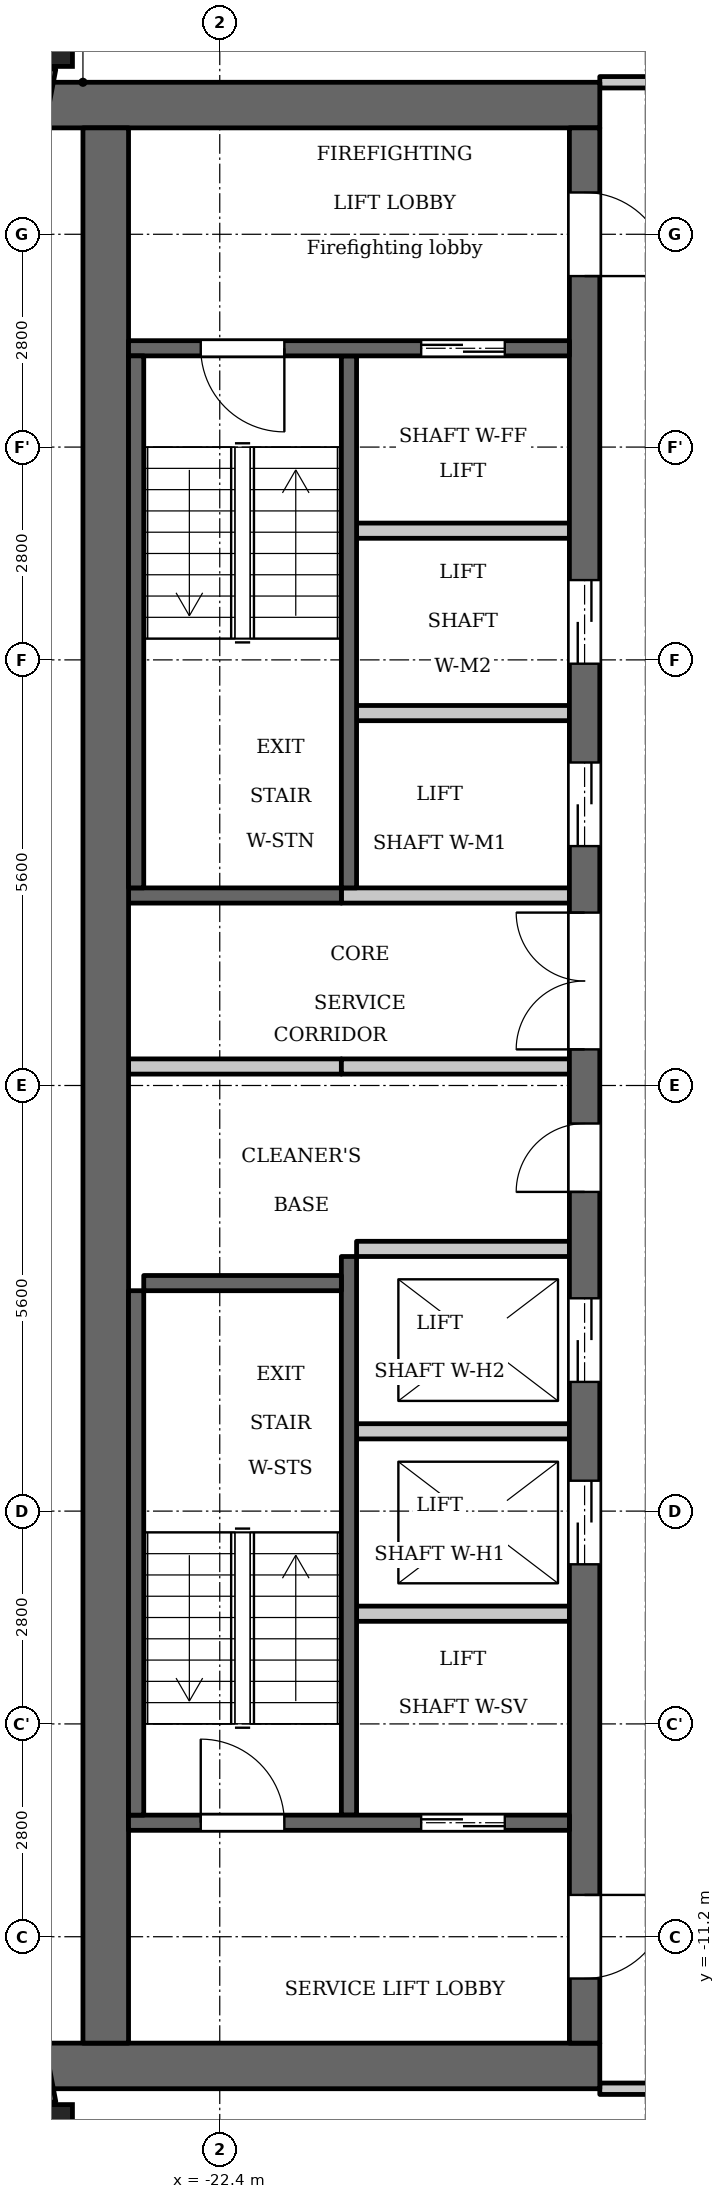
"""IFC4 building model, lengths in metres.
Left out: names, types, materials, properties, quantities, classifications, styles, units other than length and angle.
Written with IfcOpenShell. Run it as: python <this file> out.ifc"""

import sys

from ifc_helpers import new_model, si_unit, direction, frame, frame_2d, origin, origin_2d, place, context, subcontext, project, spatial, rectangle, extrude, element, fill, save


model = new_model("IFC4")
c1 = context("Model", 3, precision=1e-05, world=origin(), true_north=direction((0.0, 1.0)))
c2 = subcontext(c1, "Body", "Model", "MODEL_VIEW")
j1 = project(units=[si_unit("LENGTHUNIT", "METRE"), si_unit("PLANEANGLEUNIT", "RADIAN")], contexts=[c1])
p1 = place(None, origin())
s1 = spatial("IfcSite", under=j1, at=p1, CompositionType="ELEMENT")
p2 = place(p1, origin())
s2 = spatial("IfcBuilding", under=s1, at=p2, CompositionType="ELEMENT")
p3 = place(p2, frame((0.0, 0.0, 241.7)))
s3 = spatial("IfcBuildingStorey", under=s2, at=p3, CompositionType="ELEMENT", Elevation=241.7)
for number, where, z_axis, x_axis in (
    (1, (-24.738, 13.809, 0.0), (0.0, 0.0, 1.0), (1.0, 0.0, 0.0)),
    (2, (-24.738, -13.809, 0.0), (0.0, 0.0, 1.0), (1.0, 0.0, 0.0)),
):
    element("IfcColumn", number, at=place(p3, frame(where, z_axis=z_axis, x_axis=x_axis)), inside=s3, PredefinedType="COLUMN", context=c2, shape_type="SweptSolid", body=[
        extrude(rectangle(XDim=0.8, YDim=0.8, at=origin_2d()), origin(), (0.0, 0.0, 1.0), 3.5),
    ])
for number, where, z_axis, x_axis in (
    (3, (-24.705, 13.395, 0.0), (0.0, 0.0, 1.0), (-0.187, -0.982, 0.0)),
    (4, (-25.053, -11.572, 0.0), (0.0, 0.0, 1.0), (0.187, -0.982, 0.0)),
):
    element("IfcWall", number, at=place(p3, frame(where, z_axis=z_axis, x_axis=x_axis)), inside=s3, PredefinedType="SOLIDWALL", context=c2, shape_type="SweptSolid", body=[
        extrude(rectangle(XDim=1.856, YDim=0.3, at=frame_2d((0.928, 0.0))), origin(), (0.0, 0.0, 1.0), 2.55),
    ])
p4 = place(p3, frame((-20.7, 2.6, 0.0), z_axis=(0.0, 0.0, 1.0), x_axis=(0.0, 1.0, 0.0)))
e5 = element("IfcWall", 5, at=p4, inside=s3, PredefinedType="SHEAR", context=c2, shape_type="SweptSolid", body=[
    extrude(rectangle(XDim=7.0, YDim=0.2, at=frame_2d((3.5, 0.0))), origin(), (0.0, 0.0, 1.0), 3.2),
])
p5 = place(p3, frame((-20.7, -9.6, 0.0), z_axis=(0.0, 0.0, 1.0), x_axis=(0.0, 1.0, 0.0)))
e6 = element("IfcWall", 6, at=p5, inside=s3, PredefinedType="SHEAR", context=c2, shape_type="SweptSolid", body=[
    extrude(rectangle(XDim=7.35, YDim=0.2, at=frame_2d((3.675, 0.0))), origin(), (0.0, 0.0, 1.0), 3.2),
])
p6 = place(p3, frame((-20.8, 2.5, 0.0), z_axis=(0.0, 0.0, 1.0), x_axis=(-1.0, 0.0, 0.0)))
e7 = element("IfcWall", 7, at=p6, inside=s3, PredefinedType="SHEAR", context=c2, shape_type="SweptSolid", body=[
    extrude(rectangle(XDim=2.8, YDim=0.2, at=frame_2d((1.4, 0.0))), origin(), (0.0, 0.0, 1.0), 3.2),
])
p7 = place(p3, frame((-20.8, 0.25, 0.0), z_axis=(0.0, 0.0, 1.0), x_axis=(-1.0, 0.0, 0.0)))
e8 = element("IfcWall", 8, at=p7, inside=s3, PredefinedType="PARTITIONING", context=c2, shape_type="SweptSolid", body=[
    extrude(rectangle(XDim=2.8, YDim=0.2, at=frame_2d((1.4, 0.0))), origin(), (0.0, 0.0, 1.0), 3.2),
])
for number, where, z_axis, x_axis in (
    (9, (-17.4, 12.9, 0.0), (0.0, 0.0, 1.0), (-1.0, 0.0, 0.0)),
    (10, (-17.4, -12.9, 0.0), (0.0, 0.0, 1.0), (-1.0, 0.0, 0.0)),
):
    element("IfcWall", number, at=place(p3, frame(where, z_axis=z_axis, x_axis=x_axis)), inside=s3, PredefinedType="SHEAR", context=c2, shape_type="SweptSolid", body=[
        extrude(rectangle(XDim=7.32, YDim=0.6, at=frame_2d((3.66, 0.0))), origin(), (0.0, 0.0, 1.0), 3.2),
    ])
p8 = place(p3, frame((-17.6, -12.6, 0.0), z_axis=(0.0, 0.0, 1.0), x_axis=(0.0, 1.0, 0.0)))
e11 = element("IfcWall", 11, at=p8, inside=s3, PredefinedType="SHEAR", context=c2, shape_type="SweptSolid", body=[
    extrude(rectangle(XDim=25.2, YDim=0.4, at=frame_2d((12.6, 0.0))), origin(), (0.0, 0.0, 1.0), 3.2),
])
p9 = place(p8, frame((6.3, 0.0, 0.0)))
e12 = element("IfcOpeningElement", 12, at=p9, cuts=e11, PredefinedType="OPENING", context=c2, shape_type="SweptSolid", body=[
    extrude(rectangle(XDim=1.1, YDim=2.1, at=frame_2d((0.55, 1.05))), frame((0.0, 0.21, 0.0), z_axis=(0.0, -1.0, 0.0), x_axis=(1.0, 0.0, 0.0)), (0.0, 0.0, 1.0), 0.42),
])
p10 = place(p8, frame((8.7, 0.0, 0.0)))
e13 = element("IfcOpeningElement", 13, at=p10, cuts=e11, PredefinedType="OPENING", context=c2, shape_type="SweptSolid", body=[
    extrude(rectangle(XDim=1.1, YDim=2.1, at=frame_2d((0.55, 1.05))), frame((0.0, 0.21, 0.0), z_axis=(0.0, -1.0, 0.0), x_axis=(1.0, 0.0, 0.0)), (0.0, 0.0, 1.0), 0.42),
])
p11 = place(p8, frame((11.2, 0.0, 0.0)))
e14 = element("IfcOpeningElement", 14, at=p11, cuts=e11, PredefinedType="OPENING", context=c2, shape_type="SweptSolid", body=[
    extrude(rectangle(XDim=0.9, YDim=2.1, at=frame_2d((0.45, 1.05))), frame((0.0, 0.21, 0.0), z_axis=(0.0, -1.0, 0.0), x_axis=(1.0, 0.0, 0.0)), (0.0, 0.0, 1.0), 0.42),
])
p12 = place(p8, frame((15.75, 0.0, 0.0)))
e15 = element("IfcOpeningElement", 15, at=p12, cuts=e11, PredefinedType="OPENING", context=c2, shape_type="SweptSolid", body=[
    extrude(rectangle(XDim=1.1, YDim=2.1, at=frame_2d((0.55, 1.05))), frame((0.0, 0.21, 0.0), z_axis=(0.0, -1.0, 0.0), x_axis=(1.0, 0.0, 0.0)), (0.0, 0.0, 1.0), 0.42),
])
p13 = place(p8, frame((18.15, 0.0, 0.0)))
e16 = element("IfcOpeningElement", 16, at=p13, cuts=e11, PredefinedType="OPENING", context=c2, shape_type="SweptSolid", body=[
    extrude(rectangle(XDim=1.1, YDim=2.1, at=frame_2d((0.55, 1.05))), frame((0.0, 0.21, 0.0), z_axis=(0.0, -1.0, 0.0), x_axis=(1.0, 0.0, 0.0)), (0.0, 0.0, 1.0), 0.42),
])
p14 = place(p8, frame((23.25, 0.0, 0.0)))
e17 = element("IfcOpeningElement", 17, at=p14, cuts=e11, PredefinedType="OPENING", context=c2, shape_type="SweptSolid", body=[
    extrude(rectangle(XDim=1.1, YDim=2.1, at=frame_2d((0.55, 1.05))), frame((0.0, 0.21, 0.0), z_axis=(0.0, -1.0, 0.0), x_axis=(1.0, 0.0, 0.0)), (0.0, 0.0, 1.0), 0.42),
])
p15 = place(p8, frame((0.85, 0.0, 0.0)))
e18 = element("IfcOpeningElement", 18, at=p15, cuts=e11, PredefinedType="OPENING", context=c2, shape_type="SweptSolid", body=[
    extrude(rectangle(XDim=1.1, YDim=2.1, at=frame_2d((0.55, 1.05))), frame((0.0, 0.21, 0.0), z_axis=(0.0, -1.0, 0.0), x_axis=(1.0, 0.0, 0.0)), (0.0, 0.0, 1.0), 0.42),
])
p16 = place(p8, frame((13.075, 0.0, 0.0)))
e19 = element("IfcOpeningElement", 19, at=p16, cuts=e11, PredefinedType="OPENING", context=c2, shape_type="SweptSolid", body=[
    extrude(rectangle(XDim=1.8, YDim=2.1, at=frame_2d((0.9, 1.05))), frame((0.0, 0.21, 0.0), z_axis=(0.0, -1.0, 0.0), x_axis=(1.0, 0.0, 0.0)), (0.0, 0.0, 1.0), 0.42),
])
p17 = place(p3, frame((-23.9, -12.6, 0.0), z_axis=(0.0, 0.0, 1.0), x_axis=(0.0, 1.0, 0.0)))
e20 = element("IfcWall", 20, at=p17, inside=s3, PredefinedType="SHEAR", context=c2, shape_type="SweptSolid", body=[
    extrude(rectangle(XDim=25.2, YDim=0.6, at=frame_2d((12.6, 0.0))), origin(), (0.0, 0.0, 1.0), 3.2),
])
p18 = place(p3, frame((-17.8, -9.7, 0.0), z_axis=(0.0, 0.0, 1.0), x_axis=(-1.0, 0.0, 0.0)))
e21 = element("IfcWall", 21, at=p18, inside=s3, PredefinedType="SHEAR", context=c2, shape_type="SweptSolid", body=[
    extrude(rectangle(XDim=5.8, YDim=0.2, at=frame_2d((2.9, 0.0))), origin(), (0.0, 0.0, 1.0), 3.2),
])
p19 = place(p18, frame((0.85, 0.0, 0.0)))
e22 = element("IfcOpeningElement", 22, at=p19, cuts=e21, PredefinedType="OPENING", context=c2, shape_type="SweptSolid", body=[
    extrude(rectangle(XDim=1.1, YDim=2.1, at=frame_2d((0.55, 1.05))), frame((0.0, 0.11, 0.0), z_axis=(0.0, -1.0, 0.0), x_axis=(1.0, 0.0, 0.0)), (0.0, 0.0, 1.0), 0.22),
])
p20 = place(p18, frame((3.75, 0.0, 0.0)))
e23 = element("IfcOpeningElement", 23, at=p20, cuts=e21, PredefinedType="OPENING", context=c2, shape_type="SweptSolid", body=[
    extrude(rectangle(XDim=1.1, YDim=2.1, at=frame_2d((0.55, 1.05))), frame((0.0, 0.11, 0.0), z_axis=(0.0, -1.0, 0.0), x_axis=(1.0, 0.0, 0.0)), (0.0, 0.0, 1.0), 0.22),
])
for number, where, z_axis, x_axis in (
    (24, (-17.8, -6.95, 0.0), (0.0, 0.0, 1.0), (-1.0, 0.0, 0.0)),
    (25, (-17.8, -4.55, 0.0), (0.0, 0.0, 1.0), (-1.0, 0.0, 0.0)),
    (26, (-17.8, -2.15, 0.0), (0.0, 0.0, 1.0), (-1.0, 0.0, 0.0)),
):
    element("IfcWall", number, at=place(p3, frame(where, z_axis=z_axis, x_axis=x_axis)), inside=s3, PredefinedType="PARTITIONING", context=c2, shape_type="SweptSolid", body=[
        extrude(rectangle(XDim=2.8, YDim=0.2, at=frame_2d((1.4, 0.0))), origin(), (0.0, 0.0, 1.0), 3.2),
    ])
for number, where, z_axis, x_axis in (
    (27, (-17.8, 0.25, 0.0), (0.0, 0.0, 1.0), (-1.0, 0.0, 0.0)),
    (28, (-17.8, 2.5, 0.0), (0.0, 0.0, 1.0), (-1.0, 0.0, 0.0)),
):
    element("IfcWall", number, at=place(p3, frame(where, z_axis=z_axis, x_axis=x_axis)), inside=s3, PredefinedType="PARTITIONING", context=c2, shape_type="SweptSolid", body=[
        extrude(rectangle(XDim=3.0, YDim=0.2, at=frame_2d((1.5, 0.0))), origin(), (0.0, 0.0, 1.0), 3.2),
    ])
for number, where, z_axis, x_axis in (
    (29, (-17.8, 4.9, 0.0), (0.0, 0.0, 1.0), (-1.0, 0.0, 0.0)),
    (30, (-17.8, 7.3, 0.0), (0.0, 0.0, 1.0), (-1.0, 0.0, 0.0)),
):
    element("IfcWall", number, at=place(p3, frame(where, z_axis=z_axis, x_axis=x_axis)), inside=s3, PredefinedType="PARTITIONING", context=c2, shape_type="SweptSolid", body=[
        extrude(rectangle(XDim=2.8, YDim=0.2, at=frame_2d((1.4, 0.0))), origin(), (0.0, 0.0, 1.0), 3.2),
    ])
p21 = place(p3, frame((-17.8, 9.7, 0.0), z_axis=(0.0, 0.0, 1.0), x_axis=(-1.0, 0.0, 0.0)))
e31 = element("IfcWall", 31, at=p21, inside=s3, PredefinedType="SHEAR", context=c2, shape_type="SweptSolid", body=[
    extrude(rectangle(XDim=5.8, YDim=0.2, at=frame_2d((2.9, 0.0))), origin(), (0.0, 0.0, 1.0), 3.2),
])
p22 = place(p21, frame((0.85, 0.0, 0.0)))
e32 = element("IfcOpeningElement", 32, at=p22, cuts=e31, PredefinedType="OPENING", context=c2, shape_type="SweptSolid", body=[
    extrude(rectangle(XDim=1.1, YDim=2.1, at=frame_2d((0.55, 1.05))), frame((0.0, 0.11, 0.0), z_axis=(0.0, -1.0, 0.0), x_axis=(1.0, 0.0, 0.0)), (0.0, 0.0, 1.0), 0.22),
])
p23 = place(p21, frame((3.75, 0.0, 0.0)))
e33 = element("IfcOpeningElement", 33, at=p23, cuts=e31, PredefinedType="OPENING", context=c2, shape_type="SweptSolid", body=[
    extrude(rectangle(XDim=1.1, YDim=2.1, at=frame_2d((0.55, 1.05))), frame((0.0, 0.11, 0.0), z_axis=(0.0, -1.0, 0.0), x_axis=(1.0, 0.0, 0.0)), (0.0, 0.0, 1.0), 0.22),
])
p24 = place(p3, frame((-23.5, 2.6, 0.0), z_axis=(0.0, 0.0, 1.0), x_axis=(0.0, 1.0, 0.0)))
e34 = element("IfcWall", 34, at=p24, inside=s3, PredefinedType="SHEAR", context=c2, shape_type="SweptSolid", body=[
    extrude(rectangle(XDim=7.0, YDim=0.2, at=frame_2d((3.5, 0.0))), origin(), (0.0, 0.0, 1.0), 3.2),
])
p25 = place(p3, frame((-23.5, -9.6, 0.0), z_axis=(0.0, 0.0, 1.0), x_axis=(0.0, 1.0, 0.0)))
e35 = element("IfcWall", 35, at=p25, inside=s3, PredefinedType="SHEAR", context=c2, shape_type="SweptSolid", body=[
    extrude(rectangle(XDim=6.9, YDim=0.2, at=frame_2d((3.45, 0.0))), origin(), (0.0, 0.0, 1.0), 3.2),
])
p26 = place(p3, frame((-20.8, -2.6, 0.0), z_axis=(0.0, 0.0, 1.0), x_axis=(-1.0, 0.0, 0.0)))
e36 = element("IfcWall", 36, at=p26, inside=s3, PredefinedType="SHEAR", context=c2, shape_type="SweptSolid", body=[
    extrude(rectangle(XDim=2.6, YDim=0.2, at=frame_2d((1.3, 0.0))), origin(), (0.0, 0.0, 1.0), 3.2),
])
p27 = place(p3, frame((-17.4, -13.2, 0.0), z_axis=(0.0, 0.0, 1.0), x_axis=(1.0, 0.0, 0.0)))
e37 = element("IfcWall", 37, at=p27, inside=s3, PredefinedType="PARTITIONING", context=c2, shape_type="SweptSolid", body=[
    extrude(rectangle(XDim=2.325, YDim=0.15, at=frame_2d((1.163, 0.0))), origin(), (0.0, 0.0, 1.0), 3.2),
])
p28 = place(p27, frame((0.65, 0.0, 0.0)))
e38 = element("IfcOpeningElement", 38, at=p28, cuts=e37, PredefinedType="OPENING", context=c2, shape_type="SweptSolid", body=[
    extrude(rectangle(XDim=1.0, YDim=2.1, at=frame_2d((0.5, 1.05))), frame((0.0, 0.085, 0.0), z_axis=(0.0, -1.0, 0.0), x_axis=(1.0, 0.0, 0.0)), (0.0, 0.0, 1.0), 0.17),
])
p29 = place(p3, frame((-17.4, 13.2, 0.0), z_axis=(0.0, 0.0, 1.0), x_axis=(1.0, 0.0, 0.0)))
e39 = element("IfcWall", 39, at=p29, inside=s3, PredefinedType="PARTITIONING", context=c2, shape_type="SweptSolid", body=[
    extrude(rectangle(XDim=2.325, YDim=0.15, at=frame_2d((1.163, 0.0))), origin(), (0.0, 0.0, 1.0), 3.2),
])
p30 = place(p29, frame((0.75, 0.0, 0.0)))
e40 = element("IfcOpeningElement", 40, at=p30, cuts=e39, PredefinedType="OPENING", context=c2, shape_type="SweptSolid", body=[
    extrude(rectangle(XDim=1.0, YDim=2.1, at=frame_2d((0.5, 1.05))), frame((0.0, 0.085, 0.0), z_axis=(0.0, -1.0, 0.0), x_axis=(1.0, 0.0, 0.0)), (0.0, 0.0, 1.0), 0.17),
])
p31 = place(p19, origin())
e41 = element("IfcDoor", 41, at=p31, inside=s3, OperationType="DOUBLE_DOOR_SLIDING", PredefinedType="DOOR", context=c2, shape_type="SweptSolid", body=[
    extrude(rectangle(XDim=1.1, YDim=2.1, at=frame_2d((0.55, 1.05))), frame((0.0, 0.025, 0.0), z_axis=(0.0, -1.0, 0.0), x_axis=(1.0, 0.0, 0.0)), (0.0, 0.0, 1.0), 0.05),
])
fill(e22, e41)
p32 = place(p9, origin())
e42 = element("IfcDoor", 42, at=p32, inside=s3, OperationType="DOUBLE_DOOR_SLIDING", PredefinedType="DOOR", context=c2, shape_type="SweptSolid", body=[
    extrude(rectangle(XDim=1.1, YDim=2.1, at=frame_2d((0.55, 1.05))), frame((0.0, 0.025, 0.0), z_axis=(0.0, -1.0, 0.0), x_axis=(1.0, 0.0, 0.0)), (0.0, 0.0, 1.0), 0.05),
])
fill(e12, e42)
p33 = place(p10, origin())
e43 = element("IfcDoor", 43, at=p33, inside=s3, OperationType="DOUBLE_DOOR_SLIDING", PredefinedType="DOOR", context=c2, shape_type="SweptSolid", body=[
    extrude(rectangle(XDim=1.1, YDim=2.1, at=frame_2d((0.55, 1.05))), frame((0.0, 0.025, 0.0), z_axis=(0.0, -1.0, 0.0), x_axis=(1.0, 0.0, 0.0)), (0.0, 0.0, 1.0), 0.05),
])
fill(e13, e43)
p34 = place(p11, origin())
e44 = element("IfcDoor", 44, at=p34, inside=s3, OperationType="SINGLE_SWING_RIGHT", PredefinedType="DOOR", context=c2, shape_type="SweptSolid", body=[
    extrude(rectangle(XDim=0.9, YDim=2.1, at=frame_2d((0.45, 1.05))), frame((0.0, 0.025, 0.0), z_axis=(0.0, -1.0, 0.0), x_axis=(1.0, 0.0, 0.0)), (0.0, 0.0, 1.0), 0.05),
])
fill(e14, e44)
p35 = place(p12, origin())
e45 = element("IfcDoor", 45, at=p35, inside=s3, OperationType="DOUBLE_DOOR_SLIDING", PredefinedType="DOOR", context=c2, shape_type="SweptSolid", body=[
    extrude(rectangle(XDim=1.1, YDim=2.1, at=frame_2d((0.55, 1.05))), frame((0.0, 0.025, 0.0), z_axis=(0.0, -1.0, 0.0), x_axis=(1.0, 0.0, 0.0)), (0.0, 0.0, 1.0), 0.05),
])
fill(e15, e45)
p36 = place(p13, origin())
e46 = element("IfcDoor", 46, at=p36, inside=s3, OperationType="DOUBLE_DOOR_SLIDING", PredefinedType="DOOR", context=c2, shape_type="SweptSolid", body=[
    extrude(rectangle(XDim=1.1, YDim=2.1, at=frame_2d((0.55, 1.05))), frame((0.0, 0.025, 0.0), z_axis=(0.0, -1.0, 0.0), x_axis=(1.0, 0.0, 0.0)), (0.0, 0.0, 1.0), 0.05),
])
fill(e16, e46)
p37 = place(p22, origin())
e47 = element("IfcDoor", 47, at=p37, inside=s3, OperationType="DOUBLE_DOOR_SLIDING", PredefinedType="DOOR", context=c2, shape_type="SweptSolid", body=[
    extrude(rectangle(XDim=1.1, YDim=2.1, at=frame_2d((0.55, 1.05))), frame((0.0, 0.025, 0.0), z_axis=(0.0, -1.0, 0.0), x_axis=(1.0, 0.0, 0.0)), (0.0, 0.0, 1.0), 0.05),
])
fill(e32, e47)
p38 = place(p14, origin())
e48 = element("IfcDoor", 48, at=p38, inside=s3, OperationType="SINGLE_SWING_LEFT", PredefinedType="DOOR", context=c2, shape_type="SweptSolid", body=[
    extrude(rectangle(XDim=1.1, YDim=2.1, at=frame_2d((0.55, 1.05))), frame((0.0, 0.025, 0.0), z_axis=(0.0, -1.0, 0.0), x_axis=(1.0, 0.0, 0.0)), (0.0, 0.0, 1.0), 0.05),
])
fill(e17, e48)
p39 = place(p15, origin())
e49 = element("IfcDoor", 49, at=p39, inside=s3, OperationType="SINGLE_SWING_RIGHT", PredefinedType="DOOR", context=c2, shape_type="SweptSolid", body=[
    extrude(rectangle(XDim=1.1, YDim=2.1, at=frame_2d((0.55, 1.05))), frame((0.0, 0.025, 0.0), z_axis=(0.0, -1.0, 0.0), x_axis=(1.0, 0.0, 0.0)), (0.0, 0.0, 1.0), 0.05),
])
fill(e18, e49)
p40 = place(p23, origin())
e50 = element("IfcDoor", 50, at=p40, inside=s3, OperationType="SINGLE_SWING_RIGHT", PredefinedType="DOOR", context=c2, shape_type="SweptSolid", body=[
    extrude(rectangle(XDim=1.1, YDim=2.1, at=frame_2d((0.55, 1.05))), frame((0.0, 0.025, 0.0), z_axis=(0.0, -1.0, 0.0), x_axis=(1.0, 0.0, 0.0)), (0.0, 0.0, 1.0), 0.05),
])
fill(e33, e50)
p41 = place(p20, origin())
e51 = element("IfcDoor", 51, at=p41, inside=s3, OperationType="SINGLE_SWING_RIGHT", PredefinedType="DOOR", context=c2, shape_type="SweptSolid", body=[
    extrude(rectangle(XDim=1.1, YDim=2.1, at=frame_2d((0.55, 1.05))), frame((0.0, 0.025, 0.0), z_axis=(0.0, -1.0, 0.0), x_axis=(1.0, 0.0, 0.0)), (0.0, 0.0, 1.0), 0.05),
])
fill(e23, e51)
p42 = place(p16, origin())
e52 = element("IfcDoor", 52, at=p42, inside=s3, OperationType="DOUBLE_DOOR_SINGLE_SWING", PredefinedType="DOOR", context=c2, shape_type="SweptSolid", body=[
    extrude(rectangle(XDim=1.8, YDim=2.1, at=frame_2d((0.9, 1.05))), frame((0.0, 0.025, 0.0), z_axis=(0.0, -1.0, 0.0), x_axis=(1.0, 0.0, 0.0)), (0.0, 0.0, 1.0), 0.05),
])
fill(e19, e52)
save(model, sys.argv[1])
